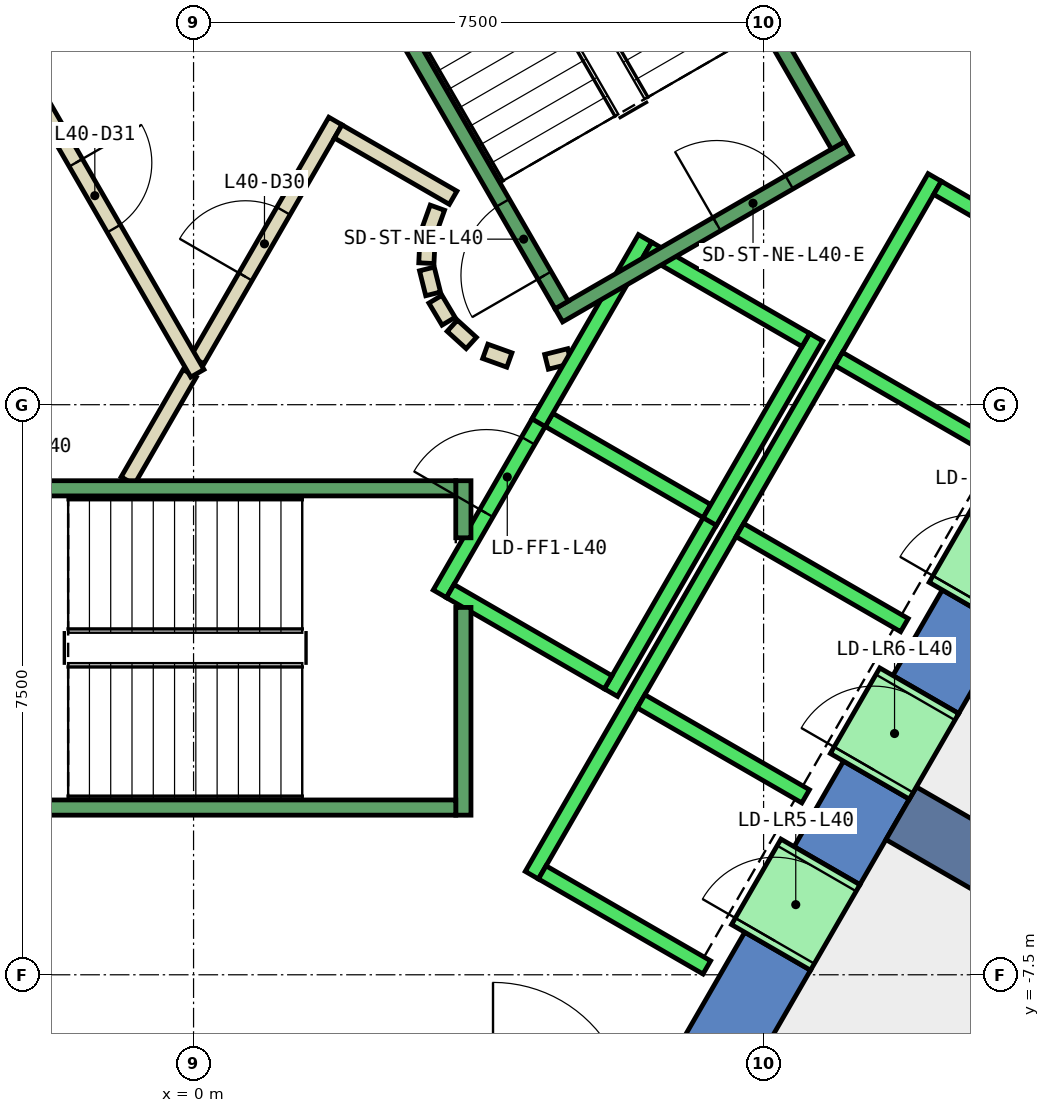
"""IFC4 building model, lengths in metres.
Left out: names, types, materials, properties, quantities, classifications, styles, units other than length and angle.
Written with IfcOpenShell. Run it as: python <this file> out.ifc"""

import sys

from ifc_helpers import new_model, si_unit, direction, frame, frame_2d, origin, place, context, subcontext, project, spatial, polyline, rectangle, outline, extrude, element, fill, save


model = new_model("IFC4")
c1 = context("Model", 3, precision=1e-05, world=origin(), true_north=direction((0.0, 1.0)))
c2 = subcontext(c1, "Body", "Model", "MODEL_VIEW")
j1 = project(units=[si_unit("LENGTHUNIT", "METRE"), si_unit("PLANEANGLEUNIT", "RADIAN")], contexts=[c1])
p1 = place(None, origin())
s1 = spatial("IfcSite", under=j1, at=p1, CompositionType="ELEMENT")
p2 = place(p1, origin())
s2 = spatial("IfcBuilding", under=s1, at=p2, CompositionType="ELEMENT")
p3 = place(p2, frame((0.0, 0.0, 180.2)))
s3 = spatial("IfcBuildingStorey", under=s2, at=p3, CompositionType="ELEMENT", Elevation=180.2)
p4 = place(p3, frame((0.0, 0.0, -0.4)))
e1 = element("IfcWall", 1, at=p4, inside=s3, PredefinedType="SHEAR", context=c2, shape_type="SweptSolid", body=[
    extrude(outline(polyline([(8.517, 11.748), (7.651, 11.248), (12.702, 2.5), (13.856, 2.5), (8.517, 11.748)])), origin(), (0.0, 0.0, 1.0), 4.0),
])
p5 = place(p3, frame((0.0, 0.0, -0.4)))
e2 = element("IfcWall", 2, at=p5, inside=s3, PredefinedType="SHEAR", context=c2, shape_type="SweptSolid", body=[
    extrude(outline(polyline([(8.117, -7.44), (7.252, -6.94), (6.351, -8.5), (6.928, -9.5), (8.117, -7.44)])), origin(), (0.0, 0.0, 1.0), 4.0),
])
p6 = place(p3, frame((0.0, 0.0, -0.4)))
e3 = element("IfcWall", 3, at=p6, inside=s3, PredefinedType="SHEAR", context=c2, shape_type="SweptSolid", body=[
    extrude(outline(polyline([(9.417, -5.189), (8.551, -4.689), (7.902, -5.814), (8.767, -6.314), (9.417, -5.189)])), origin(), (0.0, 0.0, 1.0), 4.0),
])
p7 = place(p3, frame((0.0, 0.0, -0.4)))
e4 = element("IfcWall", 4, at=p7, inside=s3, PredefinedType="SHEAR", context=c2, shape_type="SweptSolid", body=[
    extrude(outline(polyline([(10.717, -2.937), (9.851, -2.437), (9.201, -3.563), (10.067, -4.063), (10.717, -2.937)])), origin(), (0.0, 0.0, 1.0), 4.0),
])
p8 = place(p3, frame((9.31, -5.375, -0.4), z_axis=(0.0, 0.0, 1.0), x_axis=(0.866017533419, -0.500013631625, 0.0)))
e5 = element("IfcWall", 5, at=p8, inside=s3, PredefinedType="SHEAR", context=c2, shape_type="SweptSolid", body=[
    extrude(rectangle(XDim=9.0, YDim=0.8, at=frame_2d((4.5, 0.0))), origin(), (0.0, 0.0, 1.0), 4.0),
])
p9 = place(p3, frame((-0.866, -1.0, 0.0), z_axis=(0.0, 0.0, 1.0), x_axis=(0.500033287521, 0.866006184372, 0.0)))
e6 = element("IfcWall", 6, at=p9, inside=s3, PredefinedType="PARTITIONING", context=c2, shape_type="SweptSolid", body=[
    extrude(rectangle(XDim=1.632, YDim=0.2, at=frame_2d((0.816, 0.0))), origin(), (0.0, 0.0, 1.0), 3.6),
])
p10 = place(p3, frame((0.05, 0.587, 0.0), z_axis=(0.0, 0.0, 1.0), x_axis=(0.500028932171, 0.866008699143, 0.0)))
e7 = element("IfcWall", 7, at=p10, inside=s3, PredefinedType="PARTITIONING", context=c2, shape_type="SweptSolid", body=[
    extrude(rectangle(XDim=3.632, YDim=0.2, at=frame_2d((1.816, 0.0))), origin(), (0.0, 0.0, 1.0), 3.6),
])
p11 = place(p10, frame((1.266, 0.0, 0.0)))
e8 = element("IfcOpeningElement", 8, at=p11, cuts=e7, PredefinedType="OPENING", context=c2, shape_type="SweptSolid", body=[
    extrude(rectangle(XDim=1.0, YDim=2.1, at=frame_2d((0.5, 1.05))), frame((0.0, 0.11, 0.0), z_axis=(0.0, -1.0, 0.0), x_axis=(1.0, 0.0, 0.0)), (0.0, 0.0, 1.0), 0.22),
])
p12 = place(p3, frame((1.903, 3.595, 0.0), z_axis=(0.0, 0.0, 1.0), x_axis=(0.866239139897, -0.499629615326, 0.0)))
e9 = element("IfcWall", 9, at=p12, inside=s3, PredefinedType="PARTITIONING", context=c2, shape_type="SweptSolid", body=[
    extrude(rectangle(XDim=1.745, YDim=0.2, at=frame_2d((0.873, 0.0))), origin(), (0.0, 0.0, 1.0), 3.6),
])
p13 = place(p3, frame((3.208, 2.592, 0.0), z_axis=(0.0, 0.0, 1.0), x_axis=(-0.337388820924, -0.941365382578, 0.0)))
e10 = element("IfcWall", 10, at=p13, inside=s3, PredefinedType="PARTITIONING", context=c2, shape_type="SweptSolid", body=[
    extrude(rectangle(XDim=0.338, YDim=0.2, at=frame_2d((0.169, 0.0))), origin(), (0.0, 0.0, 1.0), 3.6),
])
p14 = place(p3, frame((3.079, 2.199, 0.0), z_axis=(0.0, 0.0, 1.0), x_axis=(-0.047771483479, -0.998858290933, 0.0)))
e11 = element("IfcWall", 11, at=p14, inside=s3, PredefinedType="PARTITIONING", context=c2, shape_type="SweptSolid", body=[
    extrude(rectangle(XDim=0.337, YDim=0.2, at=frame_2d((0.169, 0.0))), origin(), (0.0, 0.0, 1.0), 3.6),
])
p15 = place(p3, frame((3.07, 1.786, 0.0), z_axis=(0.0, 0.0, 1.0), x_axis=(0.242705583207, -0.970099994784, 0.0)))
e12 = element("IfcWall", 12, at=p15, inside=s3, PredefinedType="PARTITIONING", context=c2, shape_type="SweptSolid", body=[
    extrude(rectangle(XDim=0.338, YDim=0.2, at=frame_2d((0.169, 0.0))), origin(), (0.0, 0.0, 1.0), 3.6),
])
for number, where, z_axis, x_axis in (
    (13, (3.182, 1.388, 0.0), (0.0, 0.0, 1.0), (0.512, -0.859, 0.0)),
    (14, (3.404, 1.039, 0.0), (0.0, 0.0, 1.0), (0.74, -0.672, 0.0)),
):
    element("IfcWall", number, at=place(p3, frame(where, z_axis=z_axis, x_axis=x_axis)), inside=s3, PredefinedType="PARTITIONING", context=c2, shape_type="SweptSolid", body=[
        extrude(rectangle(XDim=0.338, YDim=0.2, at=frame_2d((0.169, 0.0))), origin(), (0.0, 0.0, 1.0), 3.6),
    ])
p16 = place(p3, frame((3.838, 0.702, 0.0), z_axis=(0.0, 0.0, 1.0), x_axis=(0.941035081519, -0.338308993895, 0.0)))
e15 = element("IfcWall", 15, at=p16, inside=s3, PredefinedType="PARTITIONING", context=c2, shape_type="SweptSolid", body=[
    extrude(rectangle(XDim=0.337, YDim=0.2, at=frame_2d((0.168, 0.0))), origin(), (0.0, 0.0, 1.0), 3.6),
])
p17 = place(p3, frame((4.644, 0.564, 0.0), z_axis=(0.0, 0.0, 1.0), x_axis=(0.970004408322, 0.243087325534, 0.0)))
e16 = element("IfcWall", 16, at=p17, inside=s3, PredefinedType="PARTITIONING", context=c2, shape_type="SweptSolid", body=[
    extrude(rectangle(XDim=0.312, YDim=0.2, at=frame_2d((0.156, 0.0))), origin(), (0.0, 0.0, 1.0), 3.6),
])
p18 = place(p3, frame((-2.598, 5.0, 0.0), z_axis=(0.0, 0.0, 1.0), x_axis=(0.49995654735, -0.86605048973, 0.0)))
e17 = element("IfcWall", 17, at=p18, inside=s3, PredefinedType="PARTITIONING", context=c2, shape_type="SweptSolid", body=[
    extrude(rectangle(XDim=5.296, YDim=0.2, at=frame_2d((2.648, 0.0))), origin(), (0.0, 0.0, 1.0), 3.6),
])
p19 = place(p18, frame((2.098, 0.0, 0.0)))
e18 = element("IfcOpeningElement", 18, at=p19, cuts=e17, PredefinedType="OPENING", context=c2, shape_type="SweptSolid", body=[
    extrude(rectangle(XDim=1.0, YDim=2.1, at=frame_2d((0.5, 1.05))), frame((0.0, 0.11, 0.0), z_axis=(0.0, -1.0, 0.0), x_axis=(1.0, 0.0, 0.0)), (0.0, 0.0, 1.0), 0.22),
])
p20 = place(p3, frame((12.476, -7.491, 0.0), z_axis=(0.0, 0.0, 1.0), x_axis=(-0.499989258007, -0.866031605588, 0.0)))
e19 = element("IfcWall", 19, at=p20, inside=s3, PredefinedType="PARTITIONING", context=c2, shape_type="SweptSolid", body=[
    extrude(rectangle(XDim=9.452, YDim=0.2, at=frame_2d((4.726, 0.0))), origin(), (0.0, 0.0, 1.0), 3.6),
])
p21 = place(p3, frame((3.24, -2.488, 0.0), z_axis=(0.0, 0.0, 1.0), x_axis=(0.49994636267, 0.866056369097, 0.0)))
e20 = element("IfcWall", 20, at=p21, inside=s3, PredefinedType="STANDARD", context=c2, shape_type="SweptSolid", body=[
    extrude(rectangle(XDim=2.8, YDim=0.2, at=frame_2d((1.4, 0.0))), origin(), (0.0, 0.0, 1.0), 3.6),
])
p22 = place(p21, frame((1.225, 0.0, 0.0)))
e21 = element("IfcOpeningElement", 21, at=p22, cuts=e20, PredefinedType="OPENING", context=c2, shape_type="SweptSolid", body=[
    extrude(rectangle(XDim=1.1, YDim=2.1, at=frame_2d((0.55, 1.05))), frame((0.0, 0.11, 0.0), z_axis=(0.0, -1.0, 0.0), x_axis=(1.0, 0.0, 0.0)), (0.0, 0.0, 1.0), 0.22),
])
p23 = place(p3, frame((5.492, -3.788, 0.0), z_axis=(0.0, 0.0, 1.0), x_axis=(0.500011755427, 0.866018616679, 0.0)))
e22 = element("IfcWall", 22, at=p23, inside=s3, PredefinedType="STANDARD", context=c2, shape_type="SweptSolid", body=[
    extrude(rectangle(XDim=2.8, YDim=0.2, at=frame_2d((1.4, 0.0))), origin(), (0.0, 0.0, 1.0), 3.6),
])
p24 = place(p3, frame((3.377, -2.452, 0.0), z_axis=(0.0, 0.0, 1.0), x_axis=(0.865955154139, -0.50012165622, 0.0)))
e23 = element("IfcWall", 23, at=p24, inside=s3, PredefinedType="STANDARD", context=c2, shape_type="SweptSolid", body=[
    extrude(rectangle(XDim=2.4, YDim=0.2, at=frame_2d((1.2, 0.0))), origin(), (0.0, 0.0, 1.0), 3.6),
])
p25 = place(p3, frame((4.677, -0.2, 0.0), z_axis=(0.0, 0.0, 1.0), x_axis=(0.865973769406, -0.500089422704, 0.0)))
e24 = element("IfcWall", 24, at=p25, inside=s3, PredefinedType="STANDARD", context=c2, shape_type="SweptSolid", body=[
    extrude(rectangle(XDim=2.399, YDim=0.2, at=frame_2d((1.2, 0.0))), origin(), (0.0, 0.0, 1.0), 3.6),
])
p26 = place(p3, frame((4.451, -6.19, 0.0), z_axis=(0.0, 0.0, 1.0), x_axis=(0.50000090737, 0.866024879913, 0.0)))
e25 = element("IfcWall", 25, at=p26, inside=s3, PredefinedType="STANDARD", context=c2, shape_type="SweptSolid", body=[
    extrude(rectangle(XDim=10.6, YDim=0.2, at=frame_2d((5.3, 0.0))), origin(), (0.0, 0.0, 1.0), 3.6),
])
for number, where, z_axis, x_axis in (
    (26, (4.588, -6.153, 0.0), (0.0, 0.0, 1.0), (0.866, -0.5, 0.0)),
    (27, (5.888, -3.902, 0.0), (0.0, 0.0, 1.0), (0.866, -0.5, 0.0)),
    (28, (7.188, -1.65, 0.0), (0.0, 0.0, 1.0), (0.866, -0.5, 0.0)),
    (29, (8.488, 0.602, 0.0), (0.0, 0.0, 1.0), (0.866, -0.5, 0.0)),
):
    element("IfcWall", number, at=place(p3, frame(where, z_axis=z_axis, x_axis=x_axis)), inside=s3, PredefinedType="STANDARD", context=c2, shape_type="SweptSolid", body=[
        extrude(rectangle(XDim=2.5, YDim=0.2, at=frame_2d((1.25, 0.0))), origin(), (0.0, 0.0, 1.0), 3.6),
    ])
p27 = place(p3, frame((9.788, 2.853, 0.0), z_axis=(0.0, 0.0, 1.0), x_axis=(0.865998541277, -0.500046524342, 0.0)))
e30 = element("IfcWall", 30, at=p27, inside=s3, PredefinedType="STANDARD", context=c2, shape_type="SweptSolid", body=[
    extrude(rectangle(XDim=2.5, YDim=0.2, at=frame_2d((1.25, 0.0))), origin(), (0.0, 0.0, 1.0), 3.6),
])
p28 = place(p3, frame((7.598, -7.14, 0.0), z_axis=(0.0, 0.0, 1.0), x_axis=(0.500362116554, 0.865816234728, 0.0)))
e31 = element("IfcWall", 31, at=p28, inside=s3, PredefinedType="STANDARD", context=c2, shape_type="SweptSolid", body=[
    extrude(rectangle(XDim=1.299, YDim=1.2, at=frame_2d((0.65, 0.0))), origin(), (0.0, 0.0, 1.0), 2.4),
])
p29 = place(p28, frame((0.1, 0.0, 0.0)))
e32 = element("IfcOpeningElement", 32, at=p29, cuts=e31, PredefinedType="OPENING", context=c2, shape_type="SweptSolid", body=[
    extrude(rectangle(XDim=1.1, YDim=2.3, at=frame_2d((0.55, 1.15))), frame((0.0, 0.61, 0.0), z_axis=(0.0, -1.0, 0.0), x_axis=(1.0, 0.0, 0.0)), (0.0, 0.0, 1.0), 1.22),
])
p30 = place(p3, frame((8.898, -4.889, 0.0), z_axis=(0.0, 0.0, 1.0), x_axis=(0.500036693733, 0.866004217611, 0.0)))
e33 = element("IfcWall", 33, at=p30, inside=s3, PredefinedType="STANDARD", context=c2, shape_type="SweptSolid", body=[
    extrude(rectangle(XDim=1.3, YDim=1.2, at=frame_2d((0.65, 0.0))), origin(), (0.0, 0.0, 1.0), 2.4),
])
p31 = place(p30, frame((0.1, 0.0, 0.0)))
e34 = element("IfcOpeningElement", 34, at=p31, cuts=e33, PredefinedType="OPENING", context=c2, shape_type="SweptSolid", body=[
    extrude(rectangle(XDim=1.1, YDim=2.3, at=frame_2d((0.55, 1.15))), frame((0.0, 0.61, 0.0), z_axis=(0.0, -1.0, 0.0), x_axis=(1.0, 0.0, 0.0)), (0.0, 0.0, 1.0), 1.22),
])
p32 = place(p3, frame((10.198, -2.637, 0.0), z_axis=(0.0, 0.0, 1.0), x_axis=(0.49989585183, 0.866085525409, 0.0)))
e35 = element("IfcWall", 35, at=p32, inside=s3, PredefinedType="STANDARD", context=c2, shape_type="SweptSolid", body=[
    extrude(rectangle(XDim=1.3, YDim=1.2, at=frame_2d((0.65, 0.0))), origin(), (0.0, 0.0, 1.0), 2.4),
])
p33 = place(p32, frame((0.1, 0.0, 0.0)))
e36 = element("IfcOpeningElement", 36, at=p33, cuts=e35, PredefinedType="OPENING", context=c2, shape_type="SweptSolid", body=[
    extrude(rectangle(XDim=1.1, YDim=2.3, at=frame_2d((0.55, 1.15))), frame((0.0, 0.61, 0.0), z_axis=(0.0, -1.0, 0.0), x_axis=(1.0, 0.0, 0.0)), (0.0, 0.0, 1.0), 1.22),
])
for number, where, z_axis, x_axis in (
    (37, (4.54, -0.237, 0.0), (0.0, 0.0, 1.0), (0.5, 0.866, 0.0)),
    (38, (6.792, -1.537, 0.0), (0.0, 0.0, 1.0), (0.5, 0.866, 0.0)),
):
    element("IfcWall", number, at=place(p3, frame(where, z_axis=z_axis, x_axis=x_axis)), inside=s3, PredefinedType="STANDARD", context=c2, shape_type="SweptSolid", body=[
        extrude(rectangle(XDim=2.8, YDim=0.2, at=frame_2d((1.4, 0.0))), origin(), (0.0, 0.0, 1.0), 2.3),
    ])
p34 = place(p3, frame((5.977, 2.052, 0.0), z_axis=(0.0, 0.0, 1.0), x_axis=(0.865973769406, -0.500089422704, 0.0)))
e39 = element("IfcWall", 39, at=p34, inside=s3, PredefinedType="STANDARD", context=c2, shape_type="SweptSolid", body=[
    extrude(rectangle(XDim=2.399, YDim=0.2, at=frame_2d((1.2, 0.0))), origin(), (0.0, 0.0, 1.0), 2.3),
])
p35 = place(p3, frame((3.55, -2.667, 0.0), z_axis=(0.0, 0.0, 1.0), x_axis=(0.0, -1.0, 0.0)))
e40 = element("IfcWall", 40, at=p35, inside=s3, PredefinedType="STANDARD", context=c2, shape_type="SweptSolid", body=[
    extrude(rectangle(XDim=2.733, YDim=0.2, at=frame_2d((1.366, 0.0))), origin(), (0.0, 0.0, 1.0), 3.6),
])
p36 = place(p3, frame((3.55, -1.0, 0.0), z_axis=(0.0, 0.0, 1.0), x_axis=(0.0, -1.0, 0.0)))
e41 = element("IfcWall", 41, at=p36, inside=s3, PredefinedType="STANDARD", context=c2, shape_type="SweptSolid", body=[
    extrude(rectangle(XDim=0.751, YDim=0.2, at=frame_2d((0.375, 0.0))), origin(), (0.0, 0.0, 1.0), 3.6),
])
p37 = place(p3, frame((-3.45, -1.1, 0.0), z_axis=(0.0, 0.0, 1.0), x_axis=(1.0, 0.0, 0.0)))
e42 = element("IfcWall", 42, at=p37, inside=s3, PredefinedType="STANDARD", context=c2, shape_type="SweptSolid", body=[
    extrude(rectangle(XDim=6.9, YDim=0.2, at=frame_2d((3.45, 0.0))), origin(), (0.0, 0.0, 1.0), 3.6),
])
p38 = place(p37, frame((0.45, 0.0, 0.0)))
e43 = element("IfcOpeningElement", 43, at=p38, cuts=e42, PredefinedType="OPENING", context=c2, shape_type="SweptSolid", body=[
    extrude(rectangle(XDim=1.1, YDim=2.2, at=frame_2d((0.55, 1.1))), frame((0.0, 0.11, 0.0), z_axis=(0.0, -1.0, 0.0), x_axis=(1.0, 0.0, 0.0)), (0.0, 0.0, 1.0), 0.22),
])
p39 = place(p3, frame((-3.45, -5.3, 0.0), z_axis=(0.0, 0.0, 1.0), x_axis=(1.0, 0.0, 0.0)))
e44 = element("IfcWall", 44, at=p39, inside=s3, PredefinedType="STANDARD", context=c2, shape_type="SweptSolid", body=[
    extrude(rectangle(XDim=6.9, YDim=0.2, at=frame_2d((3.45, 0.0))), origin(), (0.0, 0.0, 1.0), 3.6),
])
p40 = place(p3, frame((4.806, 1.176, 0.0), z_axis=(0.0, 0.0, 1.0), x_axis=(0.866059941101, 0.499940174841, 0.0)))
e45 = element("IfcWall", 45, at=p40, inside=s3, PredefinedType="STANDARD", context=c2, shape_type="SweptSolid", body=[
    extrude(rectangle(XDim=4.4, YDim=0.2, at=frame_2d((2.2, 0.0))), origin(), (0.0, 0.0, 1.0), 3.6),
])
p41 = place(p40, frame((2.4, 0.0, 0.0)))
e46 = element("IfcOpeningElement", 46, at=p41, cuts=e45, PredefinedType="OPENING", context=c2, shape_type="SweptSolid", body=[
    extrude(rectangle(XDim=1.1, YDim=2.2, at=frame_2d((0.55, 1.1))), frame((0.0, 0.11, 0.0), z_axis=(0.0, -1.0, 0.0), x_axis=(1.0, 0.0, 0.0)), (0.0, 0.0, 1.0), 0.22),
])
p42 = place(p3, frame((4.843, 1.312, 0.0), z_axis=(0.0, 0.0, 1.0), x_axis=(-0.499963383562, 0.866046543262, 0.0)))
e47 = element("IfcWall", 47, at=p42, inside=s3, PredefinedType="STANDARD", context=c2, shape_type="SweptSolid", body=[
    extrude(rectangle(XDim=6.9, YDim=0.2, at=frame_2d((3.45, 0.0))), origin(), (0.0, 0.0, 1.0), 3.6),
])
p43 = place(p42, frame((0.45, 0.0, 0.0)))
e48 = element("IfcOpeningElement", 48, at=p43, cuts=e47, PredefinedType="OPENING", context=c2, shape_type="SweptSolid", body=[
    extrude(rectangle(XDim=1.1, YDim=2.2, at=frame_2d((0.55, 1.1))), frame((0.0, 0.11, 0.0), z_axis=(0.0, -1.0, 0.0), x_axis=(1.0, 0.0, 0.0)), (0.0, 0.0, 1.0), 0.22),
])
p44 = place(p3, frame((8.48, 3.412, 0.0), z_axis=(0.0, 0.0, 1.0), x_axis=(-0.499978703459, 0.866037698999, 0.0)))
e49 = element("IfcWall", 49, at=p44, inside=s3, PredefinedType="STANDARD", context=c2, shape_type="SweptSolid", body=[
    extrude(rectangle(XDim=6.9, YDim=0.2, at=frame_2d((3.45, 0.0))), origin(), (0.0, 0.0, 1.0), 3.6),
])
p45 = place(p3, frame((-1.393, 7.288, 0.0), z_axis=(0.0, 0.0, 1.0), x_axis=(-0.499963383562, -0.866046543262, 0.0)))
e50 = element("IfcWall", 50, at=p45, inside=s3, PredefinedType="STANDARD", context=c2, shape_type="SweptSolid", body=[
    extrude(rectangle(XDim=6.9, YDim=0.2, at=frame_2d((3.45, 0.0))), origin(), (0.0, 0.0, 1.0), 3.6),
])
p46 = place(p45, frame((0.45, 0.0, 0.0)))
e51 = element("IfcOpeningElement", 51, at=p46, cuts=e50, PredefinedType="OPENING", context=c2, shape_type="SweptSolid", body=[
    extrude(rectangle(XDim=1.1, YDim=2.2, at=frame_2d((0.55, 1.1))), frame((0.0, 0.11, 0.0), z_axis=(0.0, -1.0, 0.0), x_axis=(1.0, 0.0, 0.0)), (0.0, 0.0, 1.0), 0.22),
])
p47 = place(p11, origin())
e52 = element("IfcDoor", 52, at=p47, inside=s3, OperationType="SINGLE_SWING_RIGHT", PredefinedType="DOOR", context=c2, shape_type="SweptSolid", body=[
    extrude(rectangle(XDim=1.0, YDim=2.1, at=frame_2d((0.5, 1.05))), frame((0.0, 0.025, 0.0), z_axis=(0.0, -1.0, 0.0), x_axis=(1.0, 0.0, 0.0)), (0.0, 0.0, 1.0), 0.05),
])
fill(e8, e52)
p48 = place(p19, origin())
e53 = element("IfcDoor", 53, at=p48, inside=s3, OperationType="SINGLE_SWING_RIGHT", PredefinedType="DOOR", context=c2, shape_type="SweptSolid", body=[
    extrude(rectangle(XDim=1.0, YDim=2.1, at=frame_2d((0.5, 1.05))), frame((0.0, 0.025, 0.0), z_axis=(0.0, -1.0, 0.0), x_axis=(1.0, 0.0, 0.0)), (0.0, 0.0, 1.0), 0.05),
])
fill(e18, e53)
p49 = place(p29, origin())
e54 = element("IfcDoor", 54, at=p49, inside=s3, OperationType="SLIDING_TO_LEFT", PredefinedType="DOOR", context=c2, shape_type="SweptSolid", body=[
    extrude(rectangle(XDim=1.1, YDim=2.3, at=frame_2d((0.55, 1.15))), frame((0.0, 0.025, 0.0), z_axis=(0.0, -1.0, 0.0), x_axis=(1.0, 0.0, 0.0)), (0.0, 0.0, 1.0), 0.05),
])
fill(e32, e54)
p50 = place(p31, origin())
e55 = element("IfcDoor", 55, at=p50, inside=s3, OperationType="SLIDING_TO_LEFT", PredefinedType="DOOR", context=c2, shape_type="SweptSolid", body=[
    extrude(rectangle(XDim=1.1, YDim=2.3, at=frame_2d((0.55, 1.15))), frame((0.0, 0.025, 0.0), z_axis=(0.0, -1.0, 0.0), x_axis=(1.0, 0.0, 0.0)), (0.0, 0.0, 1.0), 0.05),
])
fill(e34, e55)
p51 = place(p22, origin())
e56 = element("IfcDoor", 56, at=p51, inside=s3, OperationType="SLIDING_TO_LEFT", PredefinedType="DOOR", context=c2, shape_type="SweptSolid", body=[
    extrude(rectangle(XDim=1.1, YDim=2.1, at=frame_2d((0.55, 1.05))), frame((0.0, 0.025, 0.0), z_axis=(0.0, -1.0, 0.0), x_axis=(1.0, 0.0, 0.0)), (0.0, 0.0, 1.0), 0.05),
])
fill(e21, e56)
p52 = place(p43, origin())
e57 = element("IfcDoor", 57, at=p52, inside=s3, OperationType="SINGLE_SWING_LEFT", PredefinedType="DOOR", context=c2, shape_type="SweptSolid", body=[
    extrude(rectangle(XDim=1.1, YDim=2.2, at=frame_2d((0.55, 1.1))), frame((0.0, 0.025, 0.0), z_axis=(0.0, -1.0, 0.0), x_axis=(1.0, 0.0, 0.0)), (0.0, 0.0, 1.0), 0.05),
])
fill(e48, e57)
p53 = place(p41, origin())
e58 = element("IfcDoor", 58, at=p53, inside=s3, OperationType="SINGLE_SWING_LEFT", PredefinedType="DOOR", context=c2, shape_type="SweptSolid", body=[
    extrude(rectangle(XDim=1.1, YDim=2.2, at=frame_2d((0.55, 1.1))), frame((0.0, 0.025, 0.0), z_axis=(0.0, -1.0, 0.0), x_axis=(1.0, 0.0, 0.0)), (0.0, 0.0, 1.0), 0.05),
])
fill(e46, e58)
save(model, sys.argv[1])
